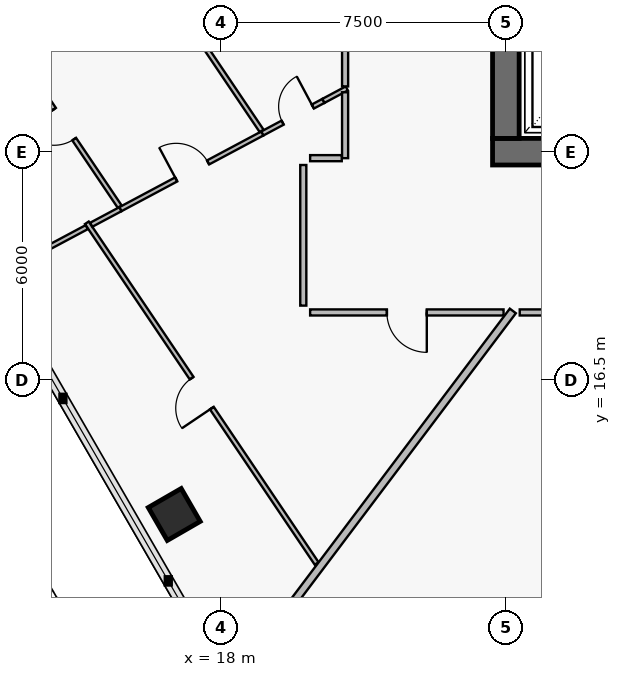
"""IFC4 building model, lengths in metres.
Left out: names, types, materials, properties, quantities, classifications, styles, units other than length and angle.
Written with IfcOpenShell. Run it as: python <this file> out.ifc"""

import sys

from ifc_helpers import new_model, si_unit, direction, frame, frame_2d, origin, origin_2d, place, context, subcontext, project, spatial, rectangle, extrude, element, fill, save


model = new_model("IFC4")
c1 = context("Model", 3, precision=1e-05, world=origin(), true_north=direction((0.0, 1.0)))
c2 = subcontext(c1, "Body", "Model", "MODEL_VIEW")
j1 = project(units=[si_unit("LENGTHUNIT", "METRE"), si_unit("PLANEANGLEUNIT", "RADIAN")], contexts=[c1])
p1 = place(None, origin())
s1 = spatial("IfcSite", under=j1, at=p1, CompositionType="ELEMENT")
p2 = place(p1, origin())
s2 = spatial("IfcBuilding", under=s1, at=p2, CompositionType="ELEMENT")
p3 = place(p2, frame((0.0, 0.0, 184.6)))
s3 = spatial("IfcBuildingStorey", under=s2, at=p3, CompositionType="ELEMENT", Elevation=184.6)
p4 = place(p3, frame((25.15, 22.5, 0.0), z_axis=(0.0, 0.0, 1.0), x_axis=(1.0, 0.0, 0.0)))
e1 = element("IfcWall", 1, at=p4, inside=s3, PredefinedType="SHEAR", context=c2, shape_type="SweptSolid", body=[
    extrude(rectangle(XDim=9.9, YDim=0.7, at=frame_2d((4.95, 0.0))), origin(), (0.0, 0.0, 1.0), 3.8),
])
p5 = place(p4, frame((4.25, 0.0, 0.0)))
e2 = element("IfcOpeningElement", 2, at=p5, cuts=e1, PredefinedType="OPENING", context=c2, shape_type="SweptSolid", body=[
    extrude(rectangle(XDim=1.5, YDim=2.15, at=frame_2d((0.75, 1.075))), frame((0.0, 0.362, 0.0), z_axis=(0.0, -1.0, 0.0), x_axis=(1.0, 0.0, 0.0)), (0.0, 0.0, 1.0), 0.724),
])
p6 = place(p3, frame((25.5, 22.85, 0.0), z_axis=(0.0, 0.0, 1.0), x_axis=(0.0, 1.0, 0.0)))
e3 = element("IfcWall", 3, at=p6, inside=s3, PredefinedType="SHEAR", context=c2, shape_type="SweptSolid", body=[
    extrude(rectangle(XDim=18.3, YDim=0.7, at=frame_2d((9.15, 0.0))), origin(), (0.0, 0.0, 1.0), 3.8),
])
p7 = place(p6, frame((8.9, 0.0, 0.0)))
e4 = element("IfcOpeningElement", 4, at=p7, cuts=e3, PredefinedType="OPENING", context=c2, shape_type="SweptSolid", body=[
    extrude(rectangle(XDim=1.1, YDim=2.15, at=frame_2d((0.55, 1.075))), frame((0.0, 0.362, 0.0), z_axis=(0.0, -1.0, 0.0), x_axis=(1.0, 0.0, 0.0)), (0.0, 0.0, 1.0), 0.724),
])
p8 = place(p3, frame((16.774, 12.953, 0.0), z_axis=(0.0, 0.0, 1.0), x_axis=(0.5, -0.866025403784, 0.0)))
e5 = element("IfcColumn", 5, at=p8, inside=s3, PredefinedType="COLUMN", context=c2, shape_type="SweptSolid", body=[
    extrude(rectangle(XDim=1.0, YDim=1.0, at=origin_2d()), origin(), (0.0, 0.0, 1.0), 3.55),
])
p9 = place(p3, frame((14.475, 20.629, 0.0), z_axis=(0.0, 0.0, 1.0), x_axis=(0.559188221227, -0.829040730749, 0.0)))
e6 = element("IfcWall", 6, at=p9, inside=s3, PredefinedType="PARTITIONING", context=c2, shape_type="SweptSolid", body=[
    extrude(rectangle(XDim=10.814, YDim=0.12, at=frame_2d((5.407, 0.0))), origin(), (0.0, 0.0, 1.0), 2.9),
])
p10 = place(p9, frame((4.932, 0.0, 0.0)))
e7 = element("IfcOpeningElement", 7, at=p10, cuts=e6, PredefinedType="OPENING", context=c2, shape_type="SweptSolid", body=[
    extrude(rectangle(XDim=0.95, YDim=2.1, at=frame_2d((0.475, 1.05))), frame((0.0, 0.072, 0.0), z_axis=(0.0, -1.0, 0.0), x_axis=(1.0, 0.0, 0.0)), (0.0, 0.0, 1.0), 0.144),
])
p11 = place(p3, frame((20.7, 23.837, 0.0), z_axis=(0.0, 0.0, 1.0), x_axis=(-0.882312188204, -0.47066463915, 0.0)))
e8 = element("IfcWall", 8, at=p11, inside=s3, PredefinedType="PARTITIONING", context=c2, shape_type="SweptSolid", body=[
    extrude(rectangle(XDim=1.824, YDim=0.12, at=frame_2d((0.912, 0.0))), origin(), (0.0, 0.0, 1.0), 3.55),
])
p12 = place(p11, frame((0.316, 0.0, 0.0)))
e9 = element("IfcOpeningElement", 9, at=p12, cuts=e8, PredefinedType="OPENING", context=c2, shape_type="SweptSolid", body=[
    extrude(rectangle(XDim=0.9, YDim=2.1, at=frame_2d((0.45, 1.05))), frame((0.0, 0.072, 0.0), z_axis=(0.0, -1.0, 0.0), x_axis=(1.0, 0.0, 0.0)), (0.0, 0.0, 1.0), 0.144),
])
p13 = place(p3, frame((19.09, 22.979, 0.0), z_axis=(0.0, 0.0, 1.0), x_axis=(-0.882290665846, -0.470704982936, 0.0)))
e10 = element("IfcWall", 10, at=p13, inside=s3, PredefinedType="PARTITIONING", context=c2, shape_type="SweptSolid", body=[
    extrude(rectangle(XDim=4.233, YDim=0.12, at=frame_2d((2.116, 0.0))), origin(), (0.0, 0.0, 1.0), 3.15),
])
p14 = place(p13, frame((1.616, 0.0, 0.0)))
e11 = element("IfcOpeningElement", 11, at=p14, cuts=e10, PredefinedType="OPENING", context=c2, shape_type="SweptSolid", body=[
    extrude(rectangle(XDim=0.95, YDim=2.1, at=frame_2d((0.475, 1.05))), frame((0.0, 0.072, 0.0), z_axis=(0.0, -1.0, 0.0), x_axis=(1.0, 0.0, 0.0)), (0.0, 0.0, 1.0), 0.144),
])
p15 = place(p3, frame((12.317, 25.536, 0.0), z_axis=(0.0, 0.0, 1.0), x_axis=(0.559205201825, -0.829029277078, 0.0)))
e12 = element("IfcWall", 12, at=p15, inside=s3, PredefinedType="PARTITIONING", context=c2, shape_type="SweptSolid", body=[
    extrude(rectangle(XDim=5.405, YDim=0.12, at=frame_2d((2.703, 0.0))), origin(), (0.0, 0.0, 1.0), 2.9),
])
p16 = place(p15, frame((2.312, 0.0, 0.0)))
e13 = element("IfcOpeningElement", 13, at=p16, cuts=e12, PredefinedType="OPENING", context=c2, shape_type="SweptSolid", body=[
    extrude(rectangle(XDim=0.95, YDim=2.1, at=frame_2d((0.475, 1.05))), frame((0.0, 0.072, 0.0), z_axis=(0.0, -1.0, 0.0), x_axis=(1.0, 0.0, 0.0)), (0.0, 0.0, 1.0), 0.144),
])
p17 = place(p3, frame((20.35, 18.27, 0.0), z_axis=(0.0, 0.0, 1.0), x_axis=(1.0, 0.0, 0.0)))
e14 = element("IfcWall", 14, at=p17, inside=s3, PredefinedType="PARTITIONING", context=c2, shape_type="SweptSolid", body=[
    extrude(rectangle(XDim=5.089, YDim=0.16, at=frame_2d((2.545, 0.0))), origin(), (0.0, 0.0, 1.0), 2.9),
])
p18 = place(p17, frame((2.02, 0.0, 0.0)))
e15 = element("IfcOpeningElement", 15, at=p18, cuts=e14, PredefinedType="OPENING", context=c2, shape_type="SweptSolid", body=[
    extrude(rectangle(XDim=1.05, YDim=2.15, at=frame_2d((0.525, 1.075))), frame((0.0, 0.092, 0.0), z_axis=(0.0, -1.0, 0.0), x_axis=(1.0, 0.0, 0.0)), (0.0, 0.0, 1.0), 0.184),
])
p19 = place(p3, frame((29.018, 16.289, 0.0), z_axis=(0.0, 0.0, 1.0), x_axis=(-0.406112696121, -0.913823001489, 0.0)))
e16 = element("IfcWall", 16, at=p19, inside=s3, PredefinedType="PARTITIONING", context=c2, shape_type="SweptSolid", body=[
    extrude(rectangle(XDim=8.79, YDim=0.12, at=frame_2d((4.395, 0.0))), origin(), (0.0, 0.0, 1.0), 3.55),
])
p20 = place(p19, frame((3.895, 0.0, 0.0)))
e17 = element("IfcOpeningElement", 17, at=p20, cuts=e16, PredefinedType="OPENING", context=c2, shape_type="SweptSolid", body=[
    extrude(rectangle(XDim=0.95, YDim=2.1, at=frame_2d((0.475, 1.05))), frame((0.0, 0.072, 0.0), z_axis=(0.0, -1.0, 0.0), x_axis=(1.0, 0.0, 0.0)), (0.0, 0.0, 1.0), 0.144),
])
p21 = place(p3, frame((25.865, 18.27, 0.0), z_axis=(0.0, 0.0, 1.0), x_axis=(1.0, 0.0, 0.0)))
e18 = element("IfcWall", 18, at=p21, inside=s3, PredefinedType="PARTITIONING", context=c2, shape_type="SweptSolid", body=[
    extrude(rectangle(XDim=4.011, YDim=0.16, at=frame_2d((2.006, 0.0))), origin(), (0.0, 0.0, 1.0), 3.55),
])
p22 = place(p21, frame((1.481, 0.0, 0.0)))
e19 = element("IfcOpeningElement", 19, at=p22, cuts=e18, PredefinedType="OPENING", context=c2, shape_type="SweptSolid", body=[
    extrude(rectangle(XDim=1.05, YDim=2.15, at=frame_2d((0.525, 1.075))), frame((0.0, 0.092, 0.0), z_axis=(0.0, -1.0, 0.0), x_axis=(1.0, 0.0, 0.0)), (0.0, 0.0, 1.0), 0.184),
])
p23 = place(p3, frame((21.31, 28.064, 0.0), z_axis=(0.0, 0.0, 1.0), x_axis=(-0.96592825044, -0.258809997878, 0.0)))
e20 = element("IfcWall", 20, at=p23, inside=s3, PredefinedType="PARTITIONING", context=c2, shape_type="SweptSolid", body=[
    extrude(rectangle(XDim=11.282, YDim=0.2, at=frame_2d((5.641, 0.0))), origin(), (0.0, 0.0, 1.0), 2.9),
])
p24 = place(p3, frame((21.315, 24.166, 0.0), z_axis=(0.0, 0.0, 1.0), x_axis=(-0.882275365563, -0.470733660705, 0.0)))
e21 = element("IfcWall", 21, at=p24, inside=s3, PredefinedType="PARTITIONING", context=c2, shape_type="SweptSolid", body=[
    extrude(rectangle(XDim=0.697, YDim=0.12, at=frame_2d((0.349, 0.0))), origin(), (0.0, 0.0, 1.0), 3.55),
])
p25 = place(p3, frame((15.356, 20.986, 0.0), z_axis=(0.0, 0.0, 1.0), x_axis=(-0.882282750181, -0.47071981978, 0.0)))
e22 = element("IfcWall", 22, at=p25, inside=s3, PredefinedType="PARTITIONING", context=c2, shape_type="SweptSolid", body=[
    extrude(rectangle(XDim=0.867, YDim=0.12, at=frame_2d((0.433, 0.0))), origin(), (0.0, 0.0, 1.0), 3.55),
])
p26 = place(p3, frame((14.47, 20.514, 0.0), z_axis=(0.0, 0.0, 1.0), x_axis=(-0.882297449113, -0.470692268141, 0.0)))
e23 = element("IfcWall", 23, at=p26, inside=s3, PredefinedType="PARTITIONING", context=c2, shape_type="SweptSolid", body=[
    extrude(rectangle(XDim=2.802, YDim=0.12, at=frame_2d((1.401, 0.0))), origin(), (0.0, 0.0, 1.0), 2.87),
])
p27 = place(p3, frame((16.615, 26.694, 0.0), z_axis=(0.0, 0.0, 1.0), x_axis=(0.559187802585, -0.829041013123, 0.0)))
e24 = element("IfcWall", 24, at=p27, inside=s3, PredefinedType="PARTITIONING", context=c2, shape_type="SweptSolid", body=[
    extrude(rectangle(XDim=4.399, YDim=0.12, at=frame_2d((2.199, 0.0))), origin(), (0.0, 0.0, 1.0), 2.9),
])
p28 = place(p3, frame((25.684, 18.31, 0.0), z_axis=(0.0, 0.0, 1.0), x_axis=(-0.601811441108, -0.798638209299, 0.0)))
e25 = element("IfcWall", 25, at=p28, inside=s3, PredefinedType="PARTITIONING", context=c2, shape_type="SweptSolid", body=[
    extrude(rectangle(XDim=12.389, YDim=0.2, at=frame_2d((6.194, 0.0))), origin(), (0.0, 0.0, 1.0), 2.87),
])
p29 = place(p3, frame((20.17, 22.15, 0.0), z_axis=(0.0, 0.0, 1.0), x_axis=(0.0, -1.0, 0.0)))
e26 = element("IfcWall", 26, at=p29, inside=s3, PredefinedType="PARTITIONING", context=c2, shape_type="SweptSolid", body=[
    extrude(rectangle(XDim=3.7, YDim=0.16, at=frame_2d((1.85, 0.0))), origin(), (0.0, 0.0, 1.0), 3.15),
])
p30 = place(p3, frame((21.27, 24.064, 0.0), z_axis=(0.0, 0.0, 1.0), x_axis=(0.0, -1.0, 0.0)))
e27 = element("IfcWall", 27, at=p30, inside=s3, PredefinedType="PARTITIONING", context=c2, shape_type="SweptSolid", body=[
    extrude(rectangle(XDim=1.734, YDim=0.16, at=frame_2d((0.867, 0.0))), origin(), (0.0, 0.0, 1.0), 3.55),
])
p31 = place(p3, frame((21.182, 22.33, 0.0), z_axis=(0.0, 0.0, 1.0), x_axis=(-1.0, 0.0, 0.0)))
e28 = element("IfcWall", 28, at=p31, inside=s3, PredefinedType="PARTITIONING", context=c2, shape_type="SweptSolid", body=[
    extrude(rectangle(XDim=0.832, YDim=0.16, at=frame_2d((0.416, 0.0))), origin(), (0.0, 0.0, 1.0), 3.55),
])
p32 = place(p3, frame((21.27, 27.894, 0.0), z_axis=(0.0, 0.0, 1.0), x_axis=(0.0, -1.0, 0.0)))
e29 = element("IfcWall", 29, at=p32, inside=s3, PredefinedType="PARTITIONING", context=c2, shape_type="SweptSolid", body=[
    extrude(rectangle(XDim=3.676, YDim=0.16, at=frame_2d((1.838, 0.0))), origin(), (0.0, 0.0, 1.0), 2.9),
])
p33 = place(p10, frame((0.95, 0.0, 0.0), z_axis=(0.0, 0.0, 1.0), x_axis=(-1.0, 0.0, 0.0)))
e30 = element("IfcDoor", 30, at=p33, inside=s3, OperationType="SINGLE_SWING_LEFT", PredefinedType="DOOR", context=c2, shape_type="SweptSolid", body=[
    extrude(rectangle(XDim=0.95, YDim=2.1, at=frame_2d((0.475, 1.05))), frame((0.0, 0.025, 0.0), z_axis=(0.0, -1.0, 0.0), x_axis=(1.0, 0.0, 0.0)), (0.0, 0.0, 1.0), 0.05),
])
fill(e7, e30)
p34 = place(p12, frame((0.9, 0.0, 0.0), z_axis=(0.0, 0.0, 1.0), x_axis=(-1.0, 0.0, 0.0)))
e31 = element("IfcDoor", 31, at=p34, inside=s3, OperationType="SINGLE_SWING_RIGHT", PredefinedType="DOOR", context=c2, shape_type="SweptSolid", body=[
    extrude(rectangle(XDim=0.9, YDim=2.1, at=frame_2d((0.45, 1.05))), frame((0.0, 0.025, 0.0), z_axis=(0.0, -1.0, 0.0), x_axis=(1.0, 0.0, 0.0)), (0.0, 0.0, 1.0), 0.05),
])
fill(e9, e31)
p35 = place(p14, frame((0.95, 0.0, 0.0), z_axis=(0.0, 0.0, 1.0), x_axis=(-1.0, 0.0, 0.0)))
e32 = element("IfcDoor", 32, at=p35, inside=s3, OperationType="SINGLE_SWING_LEFT", PredefinedType="DOOR", context=c2, shape_type="SweptSolid", body=[
    extrude(rectangle(XDim=0.95, YDim=2.1, at=frame_2d((0.475, 1.05))), frame((0.0, 0.025, 0.0), z_axis=(0.0, -1.0, 0.0), x_axis=(1.0, 0.0, 0.0)), (0.0, 0.0, 1.0), 0.05),
])
fill(e11, e32)
p36 = place(p16, frame((0.95, 0.0, 0.0), z_axis=(0.0, 0.0, 1.0), x_axis=(-1.0, 0.0, 0.0)))
e33 = element("IfcDoor", 33, at=p36, inside=s3, OperationType="SINGLE_SWING_RIGHT", PredefinedType="DOOR", context=c2, shape_type="SweptSolid", body=[
    extrude(rectangle(XDim=0.95, YDim=2.1, at=frame_2d((0.475, 1.05))), frame((0.0, 0.025, 0.0), z_axis=(0.0, -1.0, 0.0), x_axis=(1.0, 0.0, 0.0)), (0.0, 0.0, 1.0), 0.05),
])
fill(e13, e33)
p37 = place(p18, frame((1.05, 0.0, 0.0), z_axis=(0.0, 0.0, 1.0), x_axis=(-1.0, 0.0, 0.0)))
e34 = element("IfcDoor", 34, at=p37, inside=s3, OperationType="SINGLE_SWING_LEFT", PredefinedType="DOOR", context=c2, shape_type="SweptSolid", body=[
    extrude(rectangle(XDim=1.05, YDim=2.15, at=frame_2d((0.525, 1.075))), frame((0.0, 0.025, 0.0), z_axis=(0.0, -1.0, 0.0), x_axis=(1.0, 0.0, 0.0)), (0.0, 0.0, 1.0), 0.05),
])
fill(e15, e34)
save(model, sys.argv[1])
